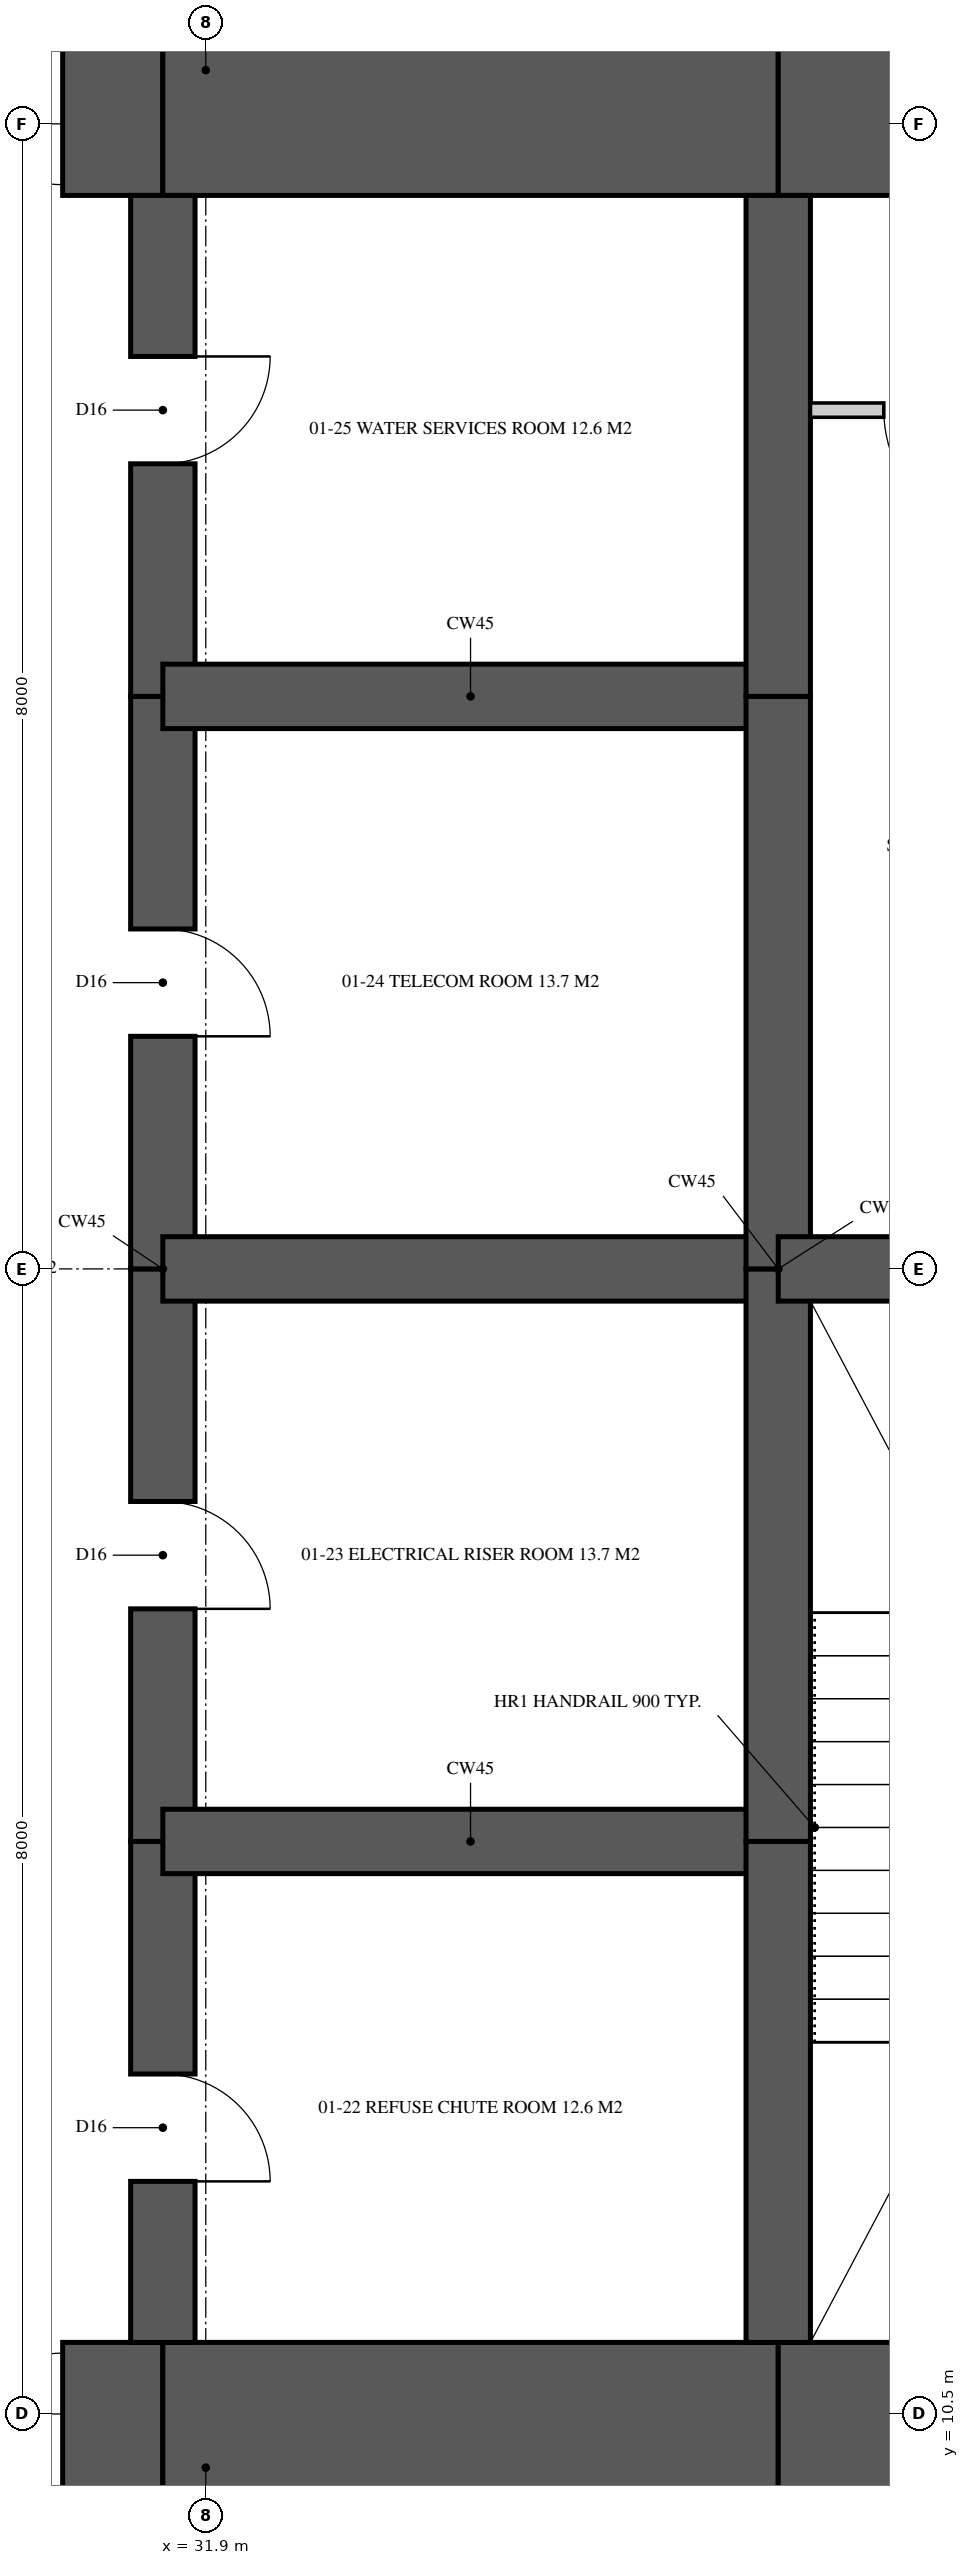
"""IFC4 building model, lengths in metres.
Left out: names, types, materials, properties, quantities, classifications, styles, units other than length and angle.
Written with IfcOpenShell. Run it as: python <this file> out.ifc"""

import sys

from ifc_helpers import new_model, si_unit, direction, frame, frame_2d, origin, place, context, subcontext, project, spatial, rectangle, extrude, element, fill, save


model = new_model("IFC4")
c1 = context("Model", 3, precision=1e-05, world=origin(), true_north=direction((0.0, 1.0)))
c2 = subcontext(c1, "Body", "Model", "MODEL_VIEW")
j1 = project(units=[si_unit("LENGTHUNIT", "METRE"), si_unit("PLANEANGLEUNIT", "RADIAN")], contexts=[c1])
p1 = place(None, origin())
s1 = spatial("IfcSite", under=j1, at=p1, CompositionType="ELEMENT")
p2 = place(p1, origin())
s2 = spatial("IfcBuilding", under=s1, at=p2, CompositionType="ELEMENT")
p3 = place(p2, frame((0.0, 0.0, 6.0)))
s3 = spatial("IfcBuildingStorey", under=s2, at=p3, CompositionType="ELEMENT", Elevation=6.0)
p4 = place(p3, frame((26.0, 10.125, 0.0), z_axis=(0.0, 0.0, 1.0), x_axis=(1.0, 0.0, 0.0)))
e1 = element("IfcWall", 1, at=p4, inside=s3, PredefinedType="SHEAR", context=c2, shape_type="SweptSolid", body=[
    extrude(rectangle(XDim=5.6, YDim=1.75, at=frame_2d((2.8, 0.0))), origin(), (0.0, 0.0, 1.0), 5.0),
])
p5 = place(p4, frame((3.3, 0.0, 0.0)))
e2 = element("IfcOpeningElement", 2, at=p5, cuts=e1, PredefinedType="OPENING", context=c2, shape_type="SweptSolid", body=[
    extrude(rectangle(XDim=1.6, YDim=2.1, at=frame_2d((0.8, 1.05))), frame((0.0, 0.885, 0.0), z_axis=(0.0, -1.0, 0.0), x_axis=(1.0, 0.0, 0.0)), (0.0, 0.0, 1.0), 1.77),
])
p6 = place(p3, frame((31.6, 10.125, 0.0), z_axis=(0.0, 0.0, 1.0), x_axis=(1.0, 0.0, 0.0)))
e3 = element("IfcWall", 3, at=p6, inside=s3, PredefinedType="SHEAR", context=c2, shape_type="SweptSolid", body=[
    extrude(rectangle(XDim=4.3, YDim=1.75, at=frame_2d((2.15, 0.0))), origin(), (0.0, 0.0, 1.0), 5.0),
])
p7 = place(p3, frame((35.9, 10.125, 0.0), z_axis=(0.0, 0.0, 1.0), x_axis=(1.0, 0.0, 0.0)))
e4 = element("IfcWall", 4, at=p7, inside=s3, PredefinedType="SHEAR", context=c2, shape_type="SweptSolid", body=[
    extrude(rectangle(XDim=8.4, YDim=1.75, at=frame_2d((4.2, 0.0))), origin(), (0.0, 0.0, 1.0), 5.0),
])
p8 = place(p7, frame((2.7, 0.0, 0.0)))
e5 = element("IfcOpeningElement", 5, at=p8, cuts=e4, PredefinedType="OPENING", context=c2, shape_type="SweptSolid", body=[
    extrude(rectangle(XDim=1.0, YDim=2.1, at=frame_2d((0.5, 1.05))), frame((0.0, 0.885, 0.0), z_axis=(0.0, -1.0, 0.0), x_axis=(1.0, 0.0, 0.0)), (0.0, 0.0, 1.0), 1.77),
])
p9 = place(p3, frame((44.3, 26.875, 0.0), z_axis=(0.0, 0.0, 1.0), x_axis=(-1.0, 0.0, 0.0)))
e6 = element("IfcWall", 6, at=p9, inside=s3, PredefinedType="SHEAR", context=c2, shape_type="SweptSolid", body=[
    extrude(rectangle(XDim=8.4, YDim=1.75, at=frame_2d((4.2, 0.0))), origin(), (0.0, 0.0, 1.0), 5.0),
])
p10 = place(p9, frame((5.8, 0.0, 0.0)))
e7 = element("IfcOpeningElement", 7, at=p10, cuts=e6, PredefinedType="OPENING", context=c2, shape_type="SweptSolid", body=[
    extrude(rectangle(XDim=0.9, YDim=2.1, at=frame_2d((0.45, 1.05))), frame((0.0, 0.885, 0.0), z_axis=(0.0, -1.0, 0.0), x_axis=(1.0, 0.0, 0.0)), (0.0, 0.0, 1.0), 1.77),
])
p11 = place(p3, frame((35.9, 26.875, 0.0), z_axis=(0.0, 0.0, 1.0), x_axis=(-1.0, 0.0, 0.0)))
e8 = element("IfcWall", 8, at=p11, inside=s3, PredefinedType="SHEAR", context=c2, shape_type="SweptSolid", body=[
    extrude(rectangle(XDim=4.3, YDim=1.75, at=frame_2d((2.15, 0.0))), origin(), (0.0, 0.0, 1.0), 5.0),
])
p12 = place(p3, frame((31.6, 26.875, 0.0), z_axis=(0.0, 0.0, 1.0), x_axis=(-1.0, 0.0, 0.0)))
e9 = element("IfcWall", 9, at=p12, inside=s3, PredefinedType="SHEAR", context=c2, shape_type="SweptSolid", body=[
    extrude(rectangle(XDim=5.6, YDim=1.75, at=frame_2d((2.8, 0.0))), origin(), (0.0, 0.0, 1.0), 5.0),
])
p13 = place(p12, frame((0.7, 0.0, 0.0)))
e10 = element("IfcOpeningElement", 10, at=p13, cuts=e9, PredefinedType="OPENING", context=c2, shape_type="SweptSolid", body=[
    extrude(rectangle(XDim=1.6, YDim=2.1, at=frame_2d((0.8, 1.05))), frame((0.0, 0.885, 0.0), z_axis=(0.0, -1.0, 0.0), x_axis=(1.0, 0.0, 0.0)), (0.0, 0.0, 1.0), 1.77),
])
p14 = place(p3, frame((31.6, 11.0, 0.0), z_axis=(0.0, 0.0, 1.0), x_axis=(0.0, 1.0, 0.0)))
e11 = element("IfcWall", 11, at=p14, inside=s3, PredefinedType="SHEAR", context=c2, shape_type="SweptSolid", body=[
    extrude(rectangle(XDim=3.5, YDim=0.45, at=frame_2d((1.75, 0.0))), origin(), (0.0, 0.0, 1.0), 5.0),
])
p15 = place(p14, frame((1.125, 0.0, 0.0)))
e12 = element("IfcOpeningElement", 12, at=p15, cuts=e11, PredefinedType="OPENING", context=c2, shape_type="SweptSolid", body=[
    extrude(rectangle(XDim=0.75, YDim=2.1, at=frame_2d((0.375, 1.05))), frame((0.0, 0.235, 0.0), z_axis=(0.0, -1.0, 0.0), x_axis=(1.0, 0.0, 0.0)), (0.0, 0.0, 1.0), 0.47),
])
p16 = place(p3, frame((31.6, 14.5, 0.0), z_axis=(0.0, 0.0, 1.0), x_axis=(0.0, 1.0, 0.0)))
e13 = element("IfcWall", 13, at=p16, inside=s3, PredefinedType="SHEAR", context=c2, shape_type="SweptSolid", body=[
    extrude(rectangle(XDim=4.0, YDim=0.45, at=frame_2d((2.0, 0.0))), origin(), (0.0, 0.0, 1.0), 5.0),
])
p17 = place(p16, frame((1.625, 0.0, 0.0)))
e14 = element("IfcOpeningElement", 14, at=p17, cuts=e13, PredefinedType="OPENING", context=c2, shape_type="SweptSolid", body=[
    extrude(rectangle(XDim=0.75, YDim=2.1, at=frame_2d((0.375, 1.05))), frame((0.0, 0.235, 0.0), z_axis=(0.0, -1.0, 0.0), x_axis=(1.0, 0.0, 0.0)), (0.0, 0.0, 1.0), 0.47),
])
p18 = place(p3, frame((31.6, 18.5, 0.0), z_axis=(0.0, 0.0, 1.0), x_axis=(0.0, 1.0, 0.0)))
e15 = element("IfcWall", 15, at=p18, inside=s3, PredefinedType="SHEAR", context=c2, shape_type="SweptSolid", body=[
    extrude(rectangle(XDim=4.0, YDim=0.45, at=frame_2d((2.0, 0.0))), origin(), (0.0, 0.0, 1.0), 5.0),
])
p19 = place(p18, frame((1.625, 0.0, 0.0)))
e16 = element("IfcOpeningElement", 16, at=p19, cuts=e15, PredefinedType="OPENING", context=c2, shape_type="SweptSolid", body=[
    extrude(rectangle(XDim=0.75, YDim=2.1, at=frame_2d((0.375, 1.05))), frame((0.0, 0.235, 0.0), z_axis=(0.0, -1.0, 0.0), x_axis=(1.0, 0.0, 0.0)), (0.0, 0.0, 1.0), 0.47),
])
p20 = place(p3, frame((31.6, 22.5, 0.0), z_axis=(0.0, 0.0, 1.0), x_axis=(0.0, 1.0, 0.0)))
e17 = element("IfcWall", 17, at=p20, inside=s3, PredefinedType="SHEAR", context=c2, shape_type="SweptSolid", body=[
    extrude(rectangle(XDim=3.5, YDim=0.45, at=frame_2d((1.75, 0.0))), origin(), (0.0, 0.0, 1.0), 5.0),
])
p21 = place(p20, frame((1.625, 0.0, 0.0)))
e18 = element("IfcOpeningElement", 18, at=p21, cuts=e17, PredefinedType="OPENING", context=c2, shape_type="SweptSolid", body=[
    extrude(rectangle(XDim=0.75, YDim=2.1, at=frame_2d((0.375, 1.05))), frame((0.0, 0.235, 0.0), z_axis=(0.0, -1.0, 0.0), x_axis=(1.0, 0.0, 0.0)), (0.0, 0.0, 1.0), 0.47),
])
p22 = place(p3, frame((35.9, 11.0, 0.0), z_axis=(0.0, 0.0, 1.0), x_axis=(0.0, 1.0, 0.0)))
e19 = element("IfcWall", 19, at=p22, inside=s3, PredefinedType="SHEAR", context=c2, shape_type="SweptSolid", body=[
    extrude(rectangle(XDim=3.5, YDim=0.45, at=frame_2d((1.75, 0.0))), origin(), (0.0, 0.0, 1.0), 5.0),
])
for number, where, z_axis, x_axis in (
    (20, (35.9, 14.5, 0.0), (0.0, 0.0, 1.0), (0.0, 1.0, 0.0)),
    (21, (35.9, 18.5, 0.0), (0.0, 0.0, 1.0), (0.0, 1.0, 0.0)),
):
    element("IfcWall", number, at=place(p3, frame(where, z_axis=z_axis, x_axis=x_axis)), inside=s3, PredefinedType="SHEAR", context=c2, shape_type="SweptSolid", body=[
        extrude(rectangle(XDim=4.0, YDim=0.45, at=frame_2d((2.0, 0.0))), origin(), (0.0, 0.0, 1.0), 5.0),
    ])
p23 = place(p3, frame((35.9, 22.5, 0.0), z_axis=(0.0, 0.0, 1.0), x_axis=(0.0, 1.0, 0.0)))
e22 = element("IfcWall", 22, at=p23, inside=s3, PredefinedType="SHEAR", context=c2, shape_type="SweptSolid", body=[
    extrude(rectangle(XDim=3.5, YDim=0.45, at=frame_2d((1.75, 0.0))), origin(), (0.0, 0.0, 1.0), 5.0),
])
for number, where, z_axis, x_axis in (
    (23, (31.6, 14.5, 0.0), (0.0, 0.0, 1.0), (1.0, 0.0, 0.0)),
    (24, (31.6, 18.5, 0.0), (0.0, 0.0, 1.0), (1.0, 0.0, 0.0)),
    (25, (31.6, 22.5, 0.0), (0.0, 0.0, 1.0), (1.0, 0.0, 0.0)),
):
    element("IfcWall", number, at=place(p3, frame(where, z_axis=z_axis, x_axis=x_axis)), inside=s3, PredefinedType="SHEAR", context=c2, shape_type="SweptSolid", body=[
        extrude(rectangle(XDim=4.3, YDim=0.45, at=frame_2d((2.15, 0.0))), origin(), (0.0, 0.0, 1.0), 5.0),
    ])
p24 = place(p3, frame((35.9, 18.5, 0.0), z_axis=(0.0, 0.0, 1.0), x_axis=(1.0, 0.0, 0.0)))
e26 = element("IfcWall", 26, at=p24, inside=s3, PredefinedType="SHEAR", context=c2, shape_type="SweptSolid", body=[
    extrude(rectangle(XDim=4.3, YDim=0.45, at=frame_2d((2.15, 0.0))), origin(), (0.0, 0.0, 1.0), 5.0),
])
p25 = place(p3, frame((36.125, 24.5, 0.0), z_axis=(0.0, 0.0, 1.0), x_axis=(1.0, 0.0, 0.0)))
e27 = element("IfcWall", 27, at=p25, inside=s3, PredefinedType="PARTITIONING", context=c2, shape_type="SweptSolid", body=[
    extrude(rectangle(XDim=3.85, YDim=0.1, at=frame_2d((1.925, 0.0))), origin(), (0.0, 0.0, 1.0), 4.72),
])
p26 = place(p25, frame((0.512, 0.0, 0.0)))
e28 = element("IfcOpeningElement", 28, at=p26, cuts=e27, PredefinedType="OPENING", context=c2, shape_type="SweptSolid", body=[
    extrude(rectangle(XDim=0.9, YDim=2.1, at=frame_2d((0.45, 1.05))), frame((0.0, 0.06, 0.0), z_axis=(0.0, -1.0, 0.0), x_axis=(1.0, 0.0, 0.0)), (0.0, 0.0, 1.0), 0.12),
])
p27 = place(p25, frame((2.438, 0.0, 0.0)))
e29 = element("IfcOpeningElement", 29, at=p27, cuts=e27, PredefinedType="OPENING", context=c2, shape_type="SweptSolid", body=[
    extrude(rectangle(XDim=0.9, YDim=2.1, at=frame_2d((0.45, 1.05))), frame((0.0, 0.06, 0.0), z_axis=(0.0, -1.0, 0.0), x_axis=(1.0, 0.0, 0.0)), (0.0, 0.0, 1.0), 0.12),
])
p28 = place(p26, frame((0.9, 0.0, 0.0), z_axis=(0.0, 0.0, 1.0), x_axis=(-1.0, 0.0, 0.0)))
e30 = element("IfcDoor", 30, at=p28, inside=s3, OperationType="SINGLE_SWING_LEFT", PredefinedType="DOOR", context=c2, shape_type="SweptSolid", body=[
    extrude(rectangle(XDim=0.9, YDim=2.1, at=frame_2d((0.45, 1.05))), frame((0.0, 0.025, 0.0), z_axis=(0.0, -1.0, 0.0), x_axis=(1.0, 0.0, 0.0)), (0.0, 0.0, 1.0), 0.05),
])
fill(e28, e30)
p29 = place(p5, origin())
e31 = element("IfcDoor", 31, at=p29, inside=s3, OperationType="DOUBLE_DOOR_SINGLE_SWING", PredefinedType="DOOR", context=c2, shape_type="SweptSolid", body=[
    extrude(rectangle(XDim=1.6, YDim=2.1, at=frame_2d((0.8, 1.05))), frame((0.0, 0.025, 0.0), z_axis=(0.0, -1.0, 0.0), x_axis=(1.0, 0.0, 0.0)), (0.0, 0.0, 1.0), 0.05),
])
fill(e2, e31)
p30 = place(p13, origin())
e32 = element("IfcDoor", 32, at=p30, inside=s3, OperationType="DOUBLE_DOOR_SINGLE_SWING", PredefinedType="DOOR", context=c2, shape_type="SweptSolid", body=[
    extrude(rectangle(XDim=1.6, YDim=2.1, at=frame_2d((0.8, 1.05))), frame((0.0, 0.025, 0.0), z_axis=(0.0, -1.0, 0.0), x_axis=(1.0, 0.0, 0.0)), (0.0, 0.0, 1.0), 0.05),
])
fill(e10, e32)
p31 = place(p15, frame((0.75, 0.0, 0.0), z_axis=(0.0, 0.0, 1.0), x_axis=(-1.0, 0.0, 0.0)))
e33 = element("IfcDoor", 33, at=p31, inside=s3, OperationType="SINGLE_SWING_RIGHT", PredefinedType="DOOR", context=c2, shape_type="SweptSolid", body=[
    extrude(rectangle(XDim=0.75, YDim=2.1, at=frame_2d((0.375, 1.05))), frame((0.0, 0.025, 0.0), z_axis=(0.0, -1.0, 0.0), x_axis=(1.0, 0.0, 0.0)), (0.0, 0.0, 1.0), 0.05),
])
fill(e12, e33)
p32 = place(p17, frame((0.75, 0.0, 0.0), z_axis=(0.0, 0.0, 1.0), x_axis=(-1.0, 0.0, 0.0)))
e34 = element("IfcDoor", 34, at=p32, inside=s3, OperationType="SINGLE_SWING_RIGHT", PredefinedType="DOOR", context=c2, shape_type="SweptSolid", body=[
    extrude(rectangle(XDim=0.75, YDim=2.1, at=frame_2d((0.375, 1.05))), frame((0.0, 0.025, 0.0), z_axis=(0.0, -1.0, 0.0), x_axis=(1.0, 0.0, 0.0)), (0.0, 0.0, 1.0), 0.05),
])
fill(e14, e34)
p33 = place(p19, frame((0.75, 0.0, 0.0), z_axis=(0.0, 0.0, 1.0), x_axis=(-1.0, 0.0, 0.0)))
e35 = element("IfcDoor", 35, at=p33, inside=s3, OperationType="SINGLE_SWING_RIGHT", PredefinedType="DOOR", context=c2, shape_type="SweptSolid", body=[
    extrude(rectangle(XDim=0.75, YDim=2.1, at=frame_2d((0.375, 1.05))), frame((0.0, 0.025, 0.0), z_axis=(0.0, -1.0, 0.0), x_axis=(1.0, 0.0, 0.0)), (0.0, 0.0, 1.0), 0.05),
])
fill(e16, e35)
p34 = place(p21, frame((0.75, 0.0, 0.0), z_axis=(0.0, 0.0, 1.0), x_axis=(-1.0, 0.0, 0.0)))
e36 = element("IfcDoor", 36, at=p34, inside=s3, OperationType="SINGLE_SWING_LEFT", PredefinedType="DOOR", context=c2, shape_type="SweptSolid", body=[
    extrude(rectangle(XDim=0.75, YDim=2.1, at=frame_2d((0.375, 1.05))), frame((0.0, 0.025, 0.0), z_axis=(0.0, -1.0, 0.0), x_axis=(1.0, 0.0, 0.0)), (0.0, 0.0, 1.0), 0.05),
])
fill(e18, e36)
save(model, sys.argv[1])
